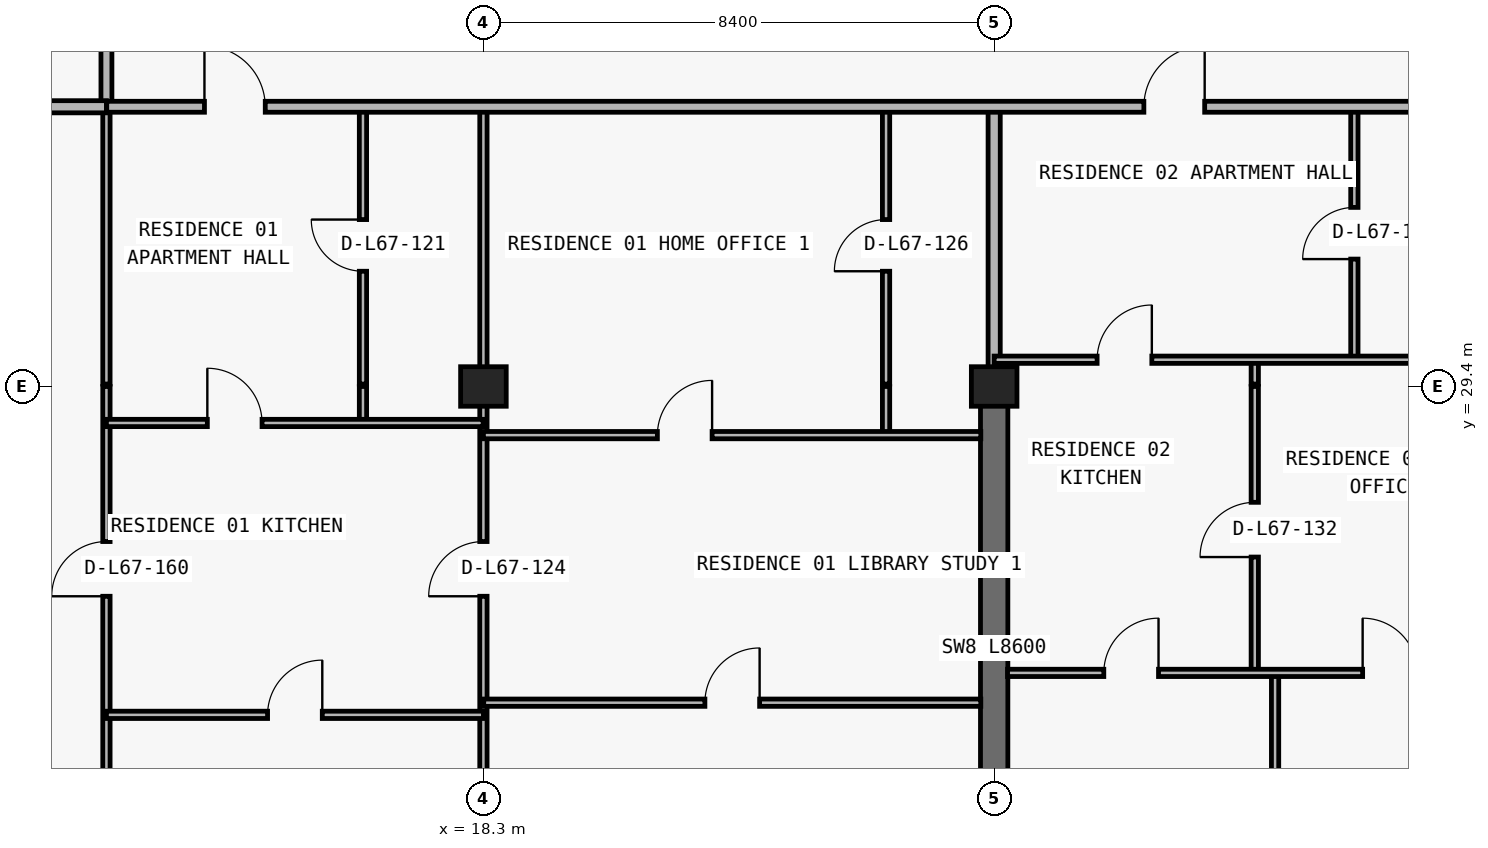
"""IFC4 building model, lengths in metres.
Left out: names, types, materials, properties, quantities, classifications, styles, units other than length and angle.
Written with IfcOpenShell. Run it as: python <this file> out.ifc"""

import sys

from ifc_helpers import new_model, si_unit, direction, frame, frame_2d, origin, origin_2d, place, context, subcontext, project, spatial, rectangle, extrude, element, fill, save


model = new_model("IFC4")
c1 = context("Model", 3, precision=1e-05, world=origin(), true_north=direction((0.0, 1.0)))
c2 = subcontext(c1, "Body", "Model", "MODEL_VIEW")
j1 = project(units=[si_unit("LENGTHUNIT", "METRE"), si_unit("PLANEANGLEUNIT", "RADIAN")], contexts=[c1])
p1 = place(None, origin())
s1 = spatial("IfcSite", under=j1, at=p1, CompositionType="ELEMENT")
p2 = place(p1, origin())
s2 = spatial("IfcBuilding", under=s1, at=p2, CompositionType="ELEMENT")
p3 = place(p2, frame((0.0, 0.0, 239.7)))
s3 = spatial("IfcBuildingStorey", under=s2, at=p3, CompositionType="ELEMENT", Elevation=239.7)
for number, where, z_axis, x_axis in (
    (1, (18.3, 29.4, 0.0), (0.0, 0.0, 1.0), (1.0, 0.0, 0.0)),
    (2, (26.7, 29.4, 0.0), (0.0, 0.0, 1.0), (1.0, 0.0, 0.0)),
):
    element("IfcColumn", number, at=place(p3, frame(where, z_axis=z_axis, x_axis=x_axis)), inside=s3, PredefinedType="COLUMN", context=c2, shape_type="SweptSolid", body=[
        extrude(rectangle(XDim=0.75, YDim=0.65, at=origin_2d()), origin(), (0.0, 0.0, 1.0), 3.05),
    ])
p4 = place(p3, frame((26.7, 20.8, 0.0), z_axis=(0.0, 0.0, 1.0), x_axis=(0.0, 1.0, 0.0)))
e3 = element("IfcWall", 3, at=p4, inside=s3, PredefinedType="SHEAR", context=c2, shape_type="SweptSolid", body=[
    extrude(rectangle(XDim=8.6, YDim=0.45, at=frame_2d((4.3, 0.0))), origin(), (0.0, 0.0, 1.0), 3.05),
])
p5 = place(p3, frame((12.1, 13.385, 0.0), z_axis=(0.0, 0.0, 1.0), x_axis=(0.0, 1.0, 0.0)))
e4 = element("IfcWall", 4, at=p5, inside=s3, PredefinedType="PARTITIONING", context=c2, shape_type="SweptSolid", body=[
    extrude(rectangle(XDim=16.015, YDim=0.12, at=frame_2d((8.007, 0.0))), origin(), (0.0, 0.0, 1.0), 3.05),
])
p6 = place(p5, frame((12.565, 0.0, 0.0)))
e5 = element("IfcOpeningElement", 5, at=p6, cuts=e4, PredefinedType="OPENING", context=c2, shape_type="SweptSolid", body=[
    extrude(rectangle(XDim=0.9, YDim=2.15, at=frame_2d((0.45, 1.075))), frame((0.0, 0.07, 0.0), z_axis=(0.0, -1.0, 0.0), x_axis=(1.0, 0.0, 0.0)), (0.0, 0.0, 1.0), 0.14),
])
p7 = place(p3, frame((12.1, 29.44, 0.0), z_axis=(0.0, 0.0, 1.0), x_axis=(0.0, 1.0, 0.0)))
e6 = element("IfcWall", 6, at=p7, inside=s3, PredefinedType="PARTITIONING", context=c2, shape_type="SweptSolid", body=[
    extrude(rectangle(XDim=4.56, YDim=0.12, at=frame_2d((2.28, 0.0))), origin(), (0.0, 0.0, 1.0), 3.05),
])
p8 = place(p3, frame((12.1, 34.005, 0.0), z_axis=(0.0, 0.0, 1.0), x_axis=(0.0, 1.0, 0.0)))
e7 = element("IfcWall", 7, at=p8, inside=s3, PredefinedType="PARTITIONING", context=c2, shape_type="SweptSolid", body=[
    extrude(rectangle(XDim=2.995, YDim=0.18, at=frame_2d((1.498, 0.0))), origin(), (0.0, 0.0, 1.0), 3.05),
])
p9 = place(p3, frame((16.319, 28.8, 0.0), z_axis=(0.0, 0.0, 1.0), x_axis=(0.0, 1.0, 0.0)))
e8 = element("IfcWall", 8, at=p9, inside=s3, PredefinedType="PARTITIONING", context=c2, shape_type="SweptSolid", body=[
    extrude(rectangle(XDim=0.6, YDim=0.12, at=frame_2d((0.3, 0.0))), origin(), (0.0, 0.0, 1.0), 3.05),
])
p10 = place(p3, frame((16.319, 29.44, 0.0), z_axis=(0.0, 0.0, 1.0), x_axis=(0.0, 1.0, 0.0)))
e9 = element("IfcWall", 9, at=p10, inside=s3, PredefinedType="PARTITIONING", context=c2, shape_type="SweptSolid", body=[
    extrude(rectangle(XDim=4.56, YDim=0.12, at=frame_2d((2.28, 0.0))), origin(), (0.0, 0.0, 1.0), 3.05),
])
p11 = place(p10, frame((1.855, 0.0, 0.0)))
e10 = element("IfcOpeningElement", 10, at=p11, cuts=e9, PredefinedType="OPENING", context=c2, shape_type="SweptSolid", body=[
    extrude(rectangle(XDim=0.85, YDim=2.1, at=frame_2d((0.425, 1.05))), frame((0.0, 0.07, 0.0), z_axis=(0.0, -1.0, 0.0), x_axis=(1.0, 0.0, 0.0)), (0.0, 0.0, 1.0), 0.14),
])
p12 = place(p3, frame((18.3, 13.34, 0.0), z_axis=(0.0, 0.0, 1.0), x_axis=(0.0, 1.0, 0.0)))
e11 = element("IfcWall", 11, at=p12, inside=s3, PredefinedType="PARTITIONING", context=c2, shape_type="SweptSolid", body=[
    extrude(rectangle(XDim=16.06, YDim=0.12, at=frame_2d((8.03, 0.0))), origin(), (0.0, 0.0, 1.0), 2.263),
])
p13 = place(p12, frame((12.61, 0.0, 0.0)))
e12 = element("IfcOpeningElement", 12, at=p13, cuts=e11, PredefinedType="OPENING", context=c2, shape_type="SweptSolid", body=[
    extrude(rectangle(XDim=0.9, YDim=2.15, at=frame_2d((0.45, 1.075))), frame((0.0, 0.07, 0.0), z_axis=(0.0, -1.0, 0.0), x_axis=(1.0, 0.0, 0.0)), (0.0, 0.0, 1.0), 0.14),
])
p14 = place(p3, frame((18.3, 29.44, 0.0), z_axis=(0.0, 0.0, 1.0), x_axis=(0.0, 1.0, 0.0)))
e13 = element("IfcWall", 13, at=p14, inside=s3, PredefinedType="PARTITIONING", context=c2, shape_type="SweptSolid", body=[
    extrude(rectangle(XDim=4.56, YDim=0.12, at=frame_2d((2.28, 0.0))), origin(), (0.0, 0.0, 1.0), 2.263),
])
p15 = place(p3, frame((24.922, 28.6, 0.0), z_axis=(0.0, 0.0, 1.0), x_axis=(0.0, 1.0, 0.0)))
e14 = element("IfcWall", 14, at=p15, inside=s3, PredefinedType="PARTITIONING", context=c2, shape_type="SweptSolid", body=[
    extrude(rectangle(XDim=0.8, YDim=0.12, at=frame_2d((0.4, 0.0))), origin(), (0.0, 0.0, 1.0), 3.05),
])
p16 = place(p3, frame((24.922, 29.44, 0.0), z_axis=(0.0, 0.0, 1.0), x_axis=(0.0, 1.0, 0.0)))
e15 = element("IfcWall", 15, at=p16, inside=s3, PredefinedType="PARTITIONING", context=c2, shape_type="SweptSolid", body=[
    extrude(rectangle(XDim=4.56, YDim=0.12, at=frame_2d((2.28, 0.0))), origin(), (0.0, 0.0, 1.0), 3.05),
])
p17 = place(p16, frame((1.855, 0.0, 0.0)))
e16 = element("IfcOpeningElement", 16, at=p17, cuts=e15, PredefinedType="OPENING", context=c2, shape_type="SweptSolid", body=[
    extrude(rectangle(XDim=0.85, YDim=2.1, at=frame_2d((0.425, 1.05))), frame((0.0, 0.07, 0.0), z_axis=(0.0, -1.0, 0.0), x_axis=(1.0, 0.0, 0.0)), (0.0, 0.0, 1.0), 0.14),
])
p18 = place(p3, frame((26.7, 29.44, 0.0), z_axis=(0.0, 0.0, 1.0), x_axis=(0.0, 1.0, 0.0)))
e17 = element("IfcWall", 17, at=p18, inside=s3, PredefinedType="PARTITIONING", context=c2, shape_type="SweptSolid", body=[
    extrude(rectangle(XDim=4.56, YDim=0.2, at=frame_2d((2.28, 0.0))), origin(), (0.0, 0.0, 1.0), 2.335),
])
p19 = place(p3, frame((30.986, 24.69, 0.0), z_axis=(0.0, 0.0, 1.0), x_axis=(0.0, 1.0, 0.0)))
e18 = element("IfcWall", 18, at=p19, inside=s3, PredefinedType="PARTITIONING", context=c2, shape_type="SweptSolid", body=[
    extrude(rectangle(XDim=4.71, YDim=0.12, at=frame_2d((2.355, 0.0))), origin(), (0.0, 0.0, 1.0), 2.629),
])
p20 = place(p19, frame((1.905, 0.0, 0.0)))
e19 = element("IfcOpeningElement", 19, at=p20, cuts=e18, PredefinedType="OPENING", context=c2, shape_type="SweptSolid", body=[
    extrude(rectangle(XDim=0.9, YDim=2.15, at=frame_2d((0.45, 1.075))), frame((0.0, 0.07, 0.0), z_axis=(0.0, -1.0, 0.0), x_axis=(1.0, 0.0, 0.0)), (0.0, 0.0, 1.0), 0.14),
])
p21 = place(p3, frame((30.986, 29.44, 0.0), z_axis=(0.0, 0.0, 1.0), x_axis=(0.0, 1.0, 0.0)))
e20 = element("IfcWall", 20, at=p21, inside=s3, PredefinedType="PARTITIONING", context=c2, shape_type="SweptSolid", body=[
    extrude(rectangle(XDim=0.4, YDim=0.12, at=frame_2d((0.2, 0.0))), origin(), (0.0, 0.0, 1.0), 2.725),
])
p22 = place(p3, frame((31.32, 13.34, 0.0), z_axis=(0.0, 0.0, 1.0), x_axis=(0.0, 1.0, 0.0)))
e21 = element("IfcWall", 21, at=p22, inside=s3, PredefinedType="PARTITIONING", context=c2, shape_type="SweptSolid", body=[
    extrude(rectangle(XDim=11.35, YDim=0.12, at=frame_2d((5.675, 0.0))), origin(), (0.0, 0.0, 1.0), 3.05),
])
p23 = place(p3, frame((32.624, 29.84, 0.0), z_axis=(0.0, 0.0, 1.0), x_axis=(0.0, 1.0, 0.0)))
e22 = element("IfcWall", 22, at=p23, inside=s3, PredefinedType="PARTITIONING", context=c2, shape_type="SweptSolid", body=[
    extrude(rectangle(XDim=4.16, YDim=0.12, at=frame_2d((2.08, 0.0))), origin(), (0.0, 0.0, 1.0), 3.05),
])
p24 = place(p23, frame((1.655, 0.0, 0.0)))
e23 = element("IfcOpeningElement", 23, at=p24, cuts=e22, PredefinedType="OPENING", context=c2, shape_type="SweptSolid", body=[
    extrude(rectangle(XDim=0.85, YDim=2.1, at=frame_2d((0.425, 1.05))), frame((0.0, 0.07, 0.0), z_axis=(0.0, -1.0, 0.0), x_axis=(1.0, 0.0, 0.0)), (0.0, 0.0, 1.0), 0.14),
])
p25 = place(p3, frame((12.1, 24.0, 0.0), z_axis=(0.0, 0.0, 1.0), x_axis=(1.0, 0.0, 0.0)))
e24 = element("IfcWall", 24, at=p25, inside=s3, PredefinedType="PARTITIONING", context=c2, shape_type="SweptSolid", body=[
    extrude(rectangle(XDim=6.2, YDim=0.12, at=frame_2d((3.1, 0.0))), origin(), (0.0, 0.0, 1.0), 3.05),
])
p26 = place(p25, frame((2.65, 0.0, 0.0)))
e25 = element("IfcOpeningElement", 25, at=p26, cuts=e24, PredefinedType="OPENING", context=c2, shape_type="SweptSolid", body=[
    extrude(rectangle(XDim=0.9, YDim=2.15, at=frame_2d((0.45, 1.075))), frame((0.0, 0.07, 0.0), z_axis=(0.0, -1.0, 0.0), x_axis=(1.0, 0.0, 0.0)), (0.0, 0.0, 1.0), 0.14),
])
p27 = place(p3, frame((18.305, 24.2, 0.0), z_axis=(0.0, 0.0, 1.0), x_axis=(1.0, 0.0, 0.0)))
e26 = element("IfcWall", 26, at=p27, inside=s3, PredefinedType="PARTITIONING", context=c2, shape_type="SweptSolid", body=[
    extrude(rectangle(XDim=8.175, YDim=0.12, at=frame_2d((4.087, 0.0))), origin(), (0.0, 0.0, 1.0), 3.05),
])
p28 = place(p27, frame((3.637, 0.0, 0.0)))
e27 = element("IfcOpeningElement", 27, at=p28, cuts=e26, PredefinedType="OPENING", context=c2, shape_type="SweptSolid", body=[
    extrude(rectangle(XDim=0.9, YDim=2.15, at=frame_2d((0.45, 1.075))), frame((0.0, 0.07, 0.0), z_axis=(0.0, -1.0, 0.0), x_axis=(1.0, 0.0, 0.0)), (0.0, 0.0, 1.0), 0.14),
])
p29 = place(p3, frame((26.92, 24.69, 0.0), z_axis=(0.0, 0.0, 1.0), x_axis=(1.0, 0.0, 0.0)))
e28 = element("IfcWall", 28, at=p29, inside=s3, PredefinedType="PARTITIONING", context=c2, shape_type="SweptSolid", body=[
    extrude(rectangle(XDim=8.18, YDim=0.12, at=frame_2d((4.09, 0.0))), origin(), (0.0, 0.0, 1.0), 3.05),
])
p30 = place(p29, frame((1.583, 0.0, 0.0)))
e29 = element("IfcOpeningElement", 29, at=p30, cuts=e28, PredefinedType="OPENING", context=c2, shape_type="SweptSolid", body=[
    extrude(rectangle(XDim=0.9, YDim=2.15, at=frame_2d((0.45, 1.075))), frame((0.0, 0.07, 0.0), z_axis=(0.0, -1.0, 0.0), x_axis=(1.0, 0.0, 0.0)), (0.0, 0.0, 1.0), 0.14),
])
p31 = place(p29, frame((5.84, 0.0, 0.0)))
e30 = element("IfcOpeningElement", 30, at=p31, cuts=e28, PredefinedType="OPENING", context=c2, shape_type="SweptSolid", body=[
    extrude(rectangle(XDim=0.9, YDim=2.15, at=frame_2d((0.45, 1.075))), frame((0.0, 0.07, 0.0), z_axis=(0.0, -1.0, 0.0), x_axis=(1.0, 0.0, 0.0)), (0.0, 0.0, 1.0), 0.14),
])
p32 = place(p3, frame((18.3, 28.6, 0.0), z_axis=(0.0, 0.0, 1.0), x_axis=(1.0, 0.0, 0.0)))
e31 = element("IfcWall", 31, at=p32, inside=s3, PredefinedType="PARTITIONING", context=c2, shape_type="SweptSolid", body=[
    extrude(rectangle(XDim=8.18, YDim=0.12, at=frame_2d((4.09, 0.0))), origin(), (0.0, 0.0, 1.0), 3.05),
])
p33 = place(p32, frame((2.861, 0.0, 0.0)))
e32 = element("IfcOpeningElement", 32, at=p33, cuts=e31, PredefinedType="OPENING", context=c2, shape_type="SweptSolid", body=[
    extrude(rectangle(XDim=0.9, YDim=2.15, at=frame_2d((0.45, 1.075))), frame((0.0, 0.07, 0.0), z_axis=(0.0, -1.0, 0.0), x_axis=(1.0, 0.0, 0.0)), (0.0, 0.0, 1.0), 0.14),
])
p34 = place(p3, frame((12.1, 28.8, 0.0), z_axis=(0.0, 0.0, 1.0), x_axis=(1.0, 0.0, 0.0)))
e33 = element("IfcWall", 33, at=p34, inside=s3, PredefinedType="PARTITIONING", context=c2, shape_type="SweptSolid", body=[
    extrude(rectangle(XDim=6.195, YDim=0.12, at=frame_2d((3.097, 0.0))), origin(), (0.0, 0.0, 1.0), 3.05),
])
p35 = place(p34, frame((1.659, 0.0, 0.0)))
e34 = element("IfcOpeningElement", 34, at=p35, cuts=e33, PredefinedType="OPENING", context=c2, shape_type="SweptSolid", body=[
    extrude(rectangle(XDim=0.9, YDim=2.15, at=frame_2d((0.45, 1.075))), frame((0.0, 0.07, 0.0), z_axis=(0.0, -1.0, 0.0), x_axis=(1.0, 0.0, 0.0)), (0.0, 0.0, 1.0), 0.14),
])
p36 = place(p3, frame((26.7, 29.84, 0.0), z_axis=(0.0, 0.0, 1.0), x_axis=(1.0, 0.0, 0.0)))
e35 = element("IfcWall", 35, at=p36, inside=s3, PredefinedType="PARTITIONING", context=c2, shape_type="SweptSolid", body=[
    extrude(rectangle(XDim=8.4, YDim=0.12, at=frame_2d((4.2, 0.0))), origin(), (0.0, 0.0, 1.0), 3.05),
])
p37 = place(p36, frame((1.693, 0.0, 0.0)))
e36 = element("IfcOpeningElement", 36, at=p37, cuts=e35, PredefinedType="OPENING", context=c2, shape_type="SweptSolid", body=[
    extrude(rectangle(XDim=0.9, YDim=2.15, at=frame_2d((0.45, 1.075))), frame((0.0, 0.07, 0.0), z_axis=(0.0, -1.0, 0.0), x_axis=(1.0, 0.0, 0.0)), (0.0, 0.0, 1.0), 0.14),
])
p38 = place(p3, frame((8.395, 34.0, 0.0), z_axis=(0.0, 0.0, 1.0), x_axis=(1.0, 0.0, 0.0)))
e37 = element("IfcWall", 37, at=p38, inside=s3, PredefinedType="PARTITIONING", context=c2, shape_type="SweptSolid", body=[
    extrude(rectangle(XDim=3.705, YDim=0.2, at=frame_2d((1.853, 0.0))), origin(), (0.0, 0.0, 1.0), 3.05),
])
p39 = place(p3, frame((12.105, 34.0, 0.0), z_axis=(0.0, 0.0, 1.0), x_axis=(1.0, 0.0, 0.0)))
e38 = element("IfcWall", 38, at=p39, inside=s3, PredefinedType="PARTITIONING", context=c2, shape_type="SweptSolid", body=[
    extrude(rectangle(XDim=53.595, YDim=0.18, at=frame_2d((26.797, 0.0))), origin(), (0.0, 0.0, 1.0), 3.05),
])
p40 = place(p39, frame((1.607, 0.0, 0.0)))
e39 = element("IfcOpeningElement", 39, at=p40, cuts=e38, PredefinedType="OPENING", context=c2, shape_type="SweptSolid", body=[
    extrude(rectangle(XDim=1.0, YDim=2.2, at=frame_2d((0.5, 1.1))), frame((0.0, 0.1, 0.0), z_axis=(0.0, -1.0, 0.0), x_axis=(1.0, 0.0, 0.0)), (0.0, 0.0, 1.0), 0.2),
])
p41 = place(p39, frame((17.057, 0.0, 0.0)))
e40 = element("IfcOpeningElement", 40, at=p41, cuts=e38, PredefinedType="OPENING", context=c2, shape_type="SweptSolid", body=[
    extrude(rectangle(XDim=1.0, YDim=2.2, at=frame_2d((0.5, 1.1))), frame((0.0, 0.1, 0.0), z_axis=(0.0, -1.0, 0.0), x_axis=(1.0, 0.0, 0.0)), (0.0, 0.0, 1.0), 0.2),
])
p42 = place(p39, frame((25.242, 0.0, 0.0)))
e41 = element("IfcOpeningElement", 41, at=p42, cuts=e38, PredefinedType="OPENING", context=c2, shape_type="SweptSolid", body=[
    extrude(rectangle(XDim=1.0, YDim=2.2, at=frame_2d((0.5, 1.1))), frame((0.0, 0.1, 0.0), z_axis=(0.0, -1.0, 0.0), x_axis=(1.0, 0.0, 0.0)), (0.0, 0.0, 1.0), 0.2),
])
p43 = place(p39, frame((33.092, 0.0, 0.0)))
e42 = element("IfcOpeningElement", 42, at=p43, cuts=e38, PredefinedType="OPENING", context=c2, shape_type="SweptSolid", body=[
    extrude(rectangle(XDim=1.0, YDim=2.2, at=frame_2d((0.5, 1.1))), frame((0.0, 0.1, 0.0), z_axis=(0.0, -1.0, 0.0), x_axis=(1.0, 0.0, 0.0)), (0.0, 0.0, 1.0), 0.2),
])
p44 = place(p39, frame((41.705, 0.0, 0.0)))
e43 = element("IfcOpeningElement", 43, at=p44, cuts=e38, PredefinedType="OPENING", context=c2, shape_type="SweptSolid", body=[
    extrude(rectangle(XDim=1.0, YDim=2.2, at=frame_2d((0.5, 1.1))), frame((0.0, 0.1, 0.0), z_axis=(0.0, -1.0, 0.0), x_axis=(1.0, 0.0, 0.0)), (0.0, 0.0, 1.0), 0.2),
])
p45 = place(p40, origin())
e44 = element("IfcDoor", 44, at=p45, inside=s3, OperationType="SINGLE_SWING_LEFT", PredefinedType="DOOR", context=c2, shape_type="SweptSolid", body=[
    extrude(rectangle(XDim=1.0, YDim=2.2, at=frame_2d((0.5, 1.1))), frame((0.0, 0.025, 0.0), z_axis=(0.0, -1.0, 0.0), x_axis=(1.0, 0.0, 0.0)), (0.0, 0.0, 1.0), 0.05),
])
fill(e39, e44)
p46 = place(p11, origin())
e45 = element("IfcDoor", 45, at=p46, inside=s3, OperationType="SINGLE_SWING_RIGHT", PredefinedType="DOOR", context=c2, shape_type="SweptSolid", body=[
    extrude(rectangle(XDim=0.85, YDim=2.1, at=frame_2d((0.425, 1.05))), frame((0.0, 0.025, 0.0), z_axis=(0.0, -1.0, 0.0), x_axis=(1.0, 0.0, 0.0)), (0.0, 0.0, 1.0), 0.05),
])
fill(e10, e45)
p47 = place(p35, origin())
e46 = element("IfcDoor", 46, at=p47, inside=s3, OperationType="SINGLE_SWING_LEFT", PredefinedType="DOOR", context=c2, shape_type="SweptSolid", body=[
    extrude(rectangle(XDim=0.9, YDim=2.15, at=frame_2d((0.45, 1.075))), frame((0.0, 0.025, 0.0), z_axis=(0.0, -1.0, 0.0), x_axis=(1.0, 0.0, 0.0)), (0.0, 0.0, 1.0), 0.05),
])
fill(e34, e46)
p48 = place(p26, origin())
e47 = element("IfcDoor", 47, at=p48, inside=s3, OperationType="SINGLE_SWING_RIGHT", PredefinedType="DOOR", context=c2, shape_type="SweptSolid", body=[
    extrude(rectangle(XDim=0.9, YDim=2.15, at=frame_2d((0.45, 1.075))), frame((0.0, 0.025, 0.0), z_axis=(0.0, -1.0, 0.0), x_axis=(1.0, 0.0, 0.0)), (0.0, 0.0, 1.0), 0.05),
])
fill(e25, e47)
p49 = place(p13, origin())
e48 = element("IfcDoor", 48, at=p49, inside=s3, OperationType="SINGLE_SWING_LEFT", PredefinedType="DOOR", context=c2, shape_type="SweptSolid", body=[
    extrude(rectangle(XDim=0.9, YDim=2.15, at=frame_2d((0.45, 1.075))), frame((0.0, 0.025, 0.0), z_axis=(0.0, -1.0, 0.0), x_axis=(1.0, 0.0, 0.0)), (0.0, 0.0, 1.0), 0.05),
])
fill(e12, e48)
p50 = place(p33, origin())
e49 = element("IfcDoor", 49, at=p50, inside=s3, OperationType="SINGLE_SWING_RIGHT", PredefinedType="DOOR", context=c2, shape_type="SweptSolid", body=[
    extrude(rectangle(XDim=0.9, YDim=2.15, at=frame_2d((0.45, 1.075))), frame((0.0, 0.025, 0.0), z_axis=(0.0, -1.0, 0.0), x_axis=(1.0, 0.0, 0.0)), (0.0, 0.0, 1.0), 0.05),
])
fill(e32, e49)
p51 = place(p17, origin())
e50 = element("IfcDoor", 50, at=p51, inside=s3, OperationType="SINGLE_SWING_LEFT", PredefinedType="DOOR", context=c2, shape_type="SweptSolid", body=[
    extrude(rectangle(XDim=0.85, YDim=2.1, at=frame_2d((0.425, 1.05))), frame((0.0, 0.025, 0.0), z_axis=(0.0, -1.0, 0.0), x_axis=(1.0, 0.0, 0.0)), (0.0, 0.0, 1.0), 0.05),
])
fill(e16, e50)
p52 = place(p28, origin())
e51 = element("IfcDoor", 51, at=p52, inside=s3, OperationType="SINGLE_SWING_RIGHT", PredefinedType="DOOR", context=c2, shape_type="SweptSolid", body=[
    extrude(rectangle(XDim=0.9, YDim=2.15, at=frame_2d((0.45, 1.075))), frame((0.0, 0.025, 0.0), z_axis=(0.0, -1.0, 0.0), x_axis=(1.0, 0.0, 0.0)), (0.0, 0.0, 1.0), 0.05),
])
fill(e27, e51)
p53 = place(p41, origin())
e52 = element("IfcDoor", 52, at=p53, inside=s3, OperationType="SINGLE_SWING_RIGHT", PredefinedType="DOOR", context=c2, shape_type="SweptSolid", body=[
    extrude(rectangle(XDim=1.0, YDim=2.2, at=frame_2d((0.5, 1.1))), frame((0.0, 0.025, 0.0), z_axis=(0.0, -1.0, 0.0), x_axis=(1.0, 0.0, 0.0)), (0.0, 0.0, 1.0), 0.05),
])
fill(e40, e52)
p54 = place(p24, origin())
e53 = element("IfcDoor", 53, at=p54, inside=s3, OperationType="SINGLE_SWING_LEFT", PredefinedType="DOOR", context=c2, shape_type="SweptSolid", body=[
    extrude(rectangle(XDim=0.85, YDim=2.1, at=frame_2d((0.425, 1.05))), frame((0.0, 0.025, 0.0), z_axis=(0.0, -1.0, 0.0), x_axis=(1.0, 0.0, 0.0)), (0.0, 0.0, 1.0), 0.05),
])
fill(e23, e53)
p55 = place(p37, origin())
e54 = element("IfcDoor", 54, at=p55, inside=s3, OperationType="SINGLE_SWING_RIGHT", PredefinedType="DOOR", context=c2, shape_type="SweptSolid", body=[
    extrude(rectangle(XDim=0.9, YDim=2.15, at=frame_2d((0.45, 1.075))), frame((0.0, 0.025, 0.0), z_axis=(0.0, -1.0, 0.0), x_axis=(1.0, 0.0, 0.0)), (0.0, 0.0, 1.0), 0.05),
])
fill(e36, e54)
p56 = place(p20, origin())
e55 = element("IfcDoor", 55, at=p56, inside=s3, OperationType="SINGLE_SWING_LEFT", PredefinedType="DOOR", context=c2, shape_type="SweptSolid", body=[
    extrude(rectangle(XDim=0.9, YDim=2.15, at=frame_2d((0.45, 1.075))), frame((0.0, 0.025, 0.0), z_axis=(0.0, -1.0, 0.0), x_axis=(1.0, 0.0, 0.0)), (0.0, 0.0, 1.0), 0.05),
])
fill(e19, e55)
p57 = place(p30, origin())
e56 = element("IfcDoor", 56, at=p57, inside=s3, OperationType="SINGLE_SWING_RIGHT", PredefinedType="DOOR", context=c2, shape_type="SweptSolid", body=[
    extrude(rectangle(XDim=0.9, YDim=2.15, at=frame_2d((0.45, 1.075))), frame((0.0, 0.025, 0.0), z_axis=(0.0, -1.0, 0.0), x_axis=(1.0, 0.0, 0.0)), (0.0, 0.0, 1.0), 0.05),
])
fill(e29, e56)
p58 = place(p31, origin())
e57 = element("IfcDoor", 57, at=p58, inside=s3, OperationType="SINGLE_SWING_LEFT", PredefinedType="DOOR", context=c2, shape_type="SweptSolid", body=[
    extrude(rectangle(XDim=0.9, YDim=2.15, at=frame_2d((0.45, 1.075))), frame((0.0, 0.025, 0.0), z_axis=(0.0, -1.0, 0.0), x_axis=(1.0, 0.0, 0.0)), (0.0, 0.0, 1.0), 0.05),
])
fill(e30, e57)
p59 = place(p6, origin())
e58 = element("IfcDoor", 58, at=p59, inside=s3, OperationType="SINGLE_SWING_LEFT", PredefinedType="DOOR", context=c2, shape_type="SweptSolid", body=[
    extrude(rectangle(XDim=0.9, YDim=2.15, at=frame_2d((0.45, 1.075))), frame((0.0, 0.025, 0.0), z_axis=(0.0, -1.0, 0.0), x_axis=(1.0, 0.0, 0.0)), (0.0, 0.0, 1.0), 0.05),
])
fill(e5, e58)
save(model, sys.argv[1])
